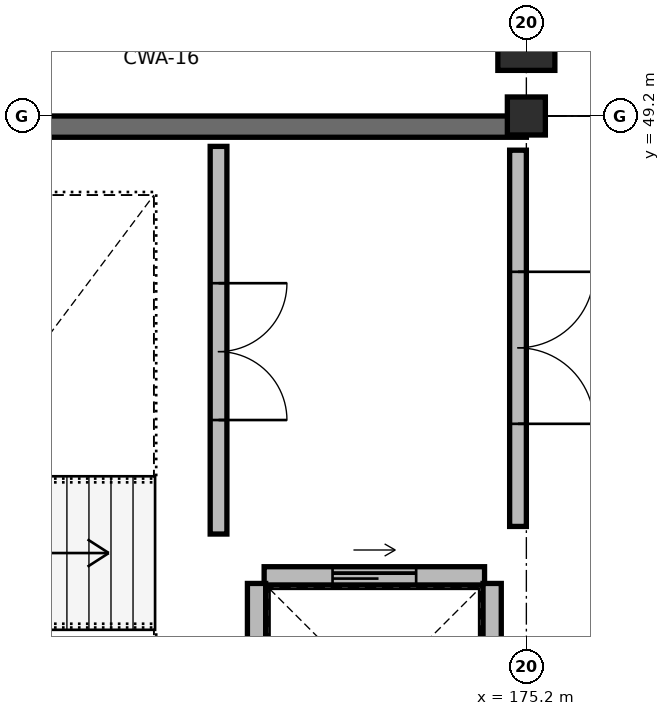
"""IFC4 building model, lengths in metres.
Left out: names, types, materials, properties, quantities, classifications, styles, units other than length and angle.
Written with IfcOpenShell. Run it as: python <this file> out.ifc"""

import sys

from ifc_helpers import new_model, si_unit, direction, frame, frame_2d, origin, origin_2d, place, context, subcontext, project, spatial, rectangle, extrude, element, fill, save


model = new_model("IFC4")
c1 = context("Model", 3, precision=1e-05, world=origin(), true_north=direction((0.0, 1.0)))
c2 = subcontext(c1, "Body", "Model", "MODEL_VIEW")
j1 = project(units=[si_unit("LENGTHUNIT", "METRE"), si_unit("PLANEANGLEUNIT", "RADIAN")], contexts=[c1])
p1 = place(None, origin())
s1 = spatial("IfcSite", under=j1, at=p1, CompositionType="ELEMENT")
p2 = place(p1, origin())
s2 = spatial("IfcBuilding", under=s1, at=p2, CompositionType="ELEMENT")
p3 = place(p2, frame((0.0, 0.0, 9.6)))
s3 = spatial("IfcBuildingStorey", under=s2, at=p3, CompositionType="ELEMENT", Elevation=9.6)
p4 = place(p3, frame((175.2, 50.4, 0.0), z_axis=(0.0, 0.0, 1.0), x_axis=(1.0, 0.0, 0.0)))
e1 = element("IfcColumn", 1, at=p4, inside=s3, PredefinedType="COLUMN", context=c2, shape_type="SweptSolid", body=[
    extrude(rectangle(XDim=0.75, YDim=1.2, at=origin_2d()), origin(), (0.0, 0.0, 1.0), 2.51),
])
p5 = place(p3, frame((175.2, 49.2, 0.0), z_axis=(0.0, 0.0, 1.0), x_axis=(1.0, 0.0, 0.0)))
e2 = element("IfcColumn", 2, at=p5, inside=s3, PredefinedType="COLUMN", context=c2, shape_type="SweptSolid", body=[
    extrude(rectangle(XDim=0.5, YDim=0.5, at=origin_2d()), origin(), (0.0, 0.0, 1.0), 4.5),
])
p6 = place(p3, frame((163.8, 49.06, 0.0), z_axis=(0.0, 0.0, 1.0), x_axis=(1.0, 0.0, 0.0)))
e3 = element("IfcWall", 3, at=p6, inside=s3, PredefinedType="SHEAR", context=c2, shape_type="SweptSolid", body=[
    extrude(rectangle(XDim=11.4, YDim=0.28, at=frame_2d((5.7, 0.0))), origin(), (0.0, 0.0, 1.0), 4.5),
])
p7 = place(p3, frame((171.15, 43.7, 0.0), z_axis=(0.0, 0.0, 1.0), x_axis=(0.0, 1.0, 0.0)))
e4 = element("IfcWall", 4, at=p7, inside=s3, PredefinedType="PARTITIONING", context=c2, shape_type="SweptSolid", body=[
    extrude(rectangle(XDim=5.1, YDim=0.22, at=frame_2d((2.55, 0.0))), origin(), (0.0, 0.0, 1.0), 4.205),
])
p8 = place(p7, frame((1.5, 0.0, 0.0)))
e5 = element("IfcOpeningElement", 5, at=p8, cuts=e4, PredefinedType="OPENING", context=c2, shape_type="SweptSolid", body=[
    extrude(rectangle(XDim=1.8, YDim=2.2, at=frame_2d((0.9, 1.1))), frame((0.0, 0.12, 0.0), z_axis=(0.0, -1.0, 0.0), x_axis=(1.0, 0.0, 0.0)), (0.0, 0.0, 1.0), 0.24),
])
p9 = place(p3, frame((171.75, 43.15, 0.0), z_axis=(0.0, 0.0, 1.0), x_axis=(1.0, 0.0, 0.0)))
e6 = element("IfcWall", 6, at=p9, inside=s3, PredefinedType="SOLIDWALL", context=c2, shape_type="SweptSolid", body=[
    extrude(rectangle(XDim=2.9, YDim=0.24, at=frame_2d((1.45, 0.0))), origin(), (0.0, 0.0, 1.0), 4.205),
])
p10 = place(p9, frame((0.9, 0.0, 0.0)))
e7 = element("IfcOpeningElement", 7, at=p10, cuts=e6, PredefinedType="OPENING", context=c2, shape_type="SweptSolid", body=[
    extrude(rectangle(XDim=1.1, YDim=2.15, at=frame_2d((0.55, 1.075))), frame((0.0, 0.13, 0.0), z_axis=(0.0, -1.0, 0.0), x_axis=(1.0, 0.0, 0.0)), (0.0, 0.0, 1.0), 0.26),
])
for number, where, z_axis, x_axis in (
    (8, (171.65, 40.05, 0.0), (0.0, 0.0, 1.0), (0.0, 1.0, 0.0)),
    (9, (174.75, 40.05, 0.0), (0.0, 0.0, 1.0), (0.0, 1.0, 0.0)),
):
    element("IfcWall", number, at=place(p3, frame(where, z_axis=z_axis, x_axis=x_axis)), inside=s3, PredefinedType="SOLIDWALL", context=c2, shape_type="SweptSolid", body=[
        extrude(rectangle(XDim=3.0, YDim=0.24, at=frame_2d((1.5, 0.0))), origin(), (0.0, 0.0, 1.0), 4.205),
    ])
p11 = place(p3, frame((175.09, 43.8, 0.0), z_axis=(0.0, 0.0, 1.0), x_axis=(0.0, 1.0, 0.0)))
e10 = element("IfcWall", 10, at=p11, inside=s3, PredefinedType="PARTITIONING", context=c2, shape_type="SweptSolid", body=[
    extrude(rectangle(XDim=4.95, YDim=0.22, at=frame_2d((2.475, 0.0))), origin(), (0.0, 0.0, 1.0), 3.635),
])
p12 = place(p11, frame((1.35, 0.0, 0.0)))
e11 = element("IfcOpeningElement", 11, at=p12, cuts=e10, PredefinedType="OPENING", context=c2, shape_type="SweptSolid", body=[
    extrude(rectangle(XDim=2.0, YDim=2.2, at=frame_2d((1.0, 1.1))), frame((0.0, 0.12, 0.0), z_axis=(0.0, -1.0, 0.0), x_axis=(1.0, 0.0, 0.0)), (0.0, 0.0, 1.0), 0.24),
])
p13 = place(p8, origin())
e12 = element("IfcDoor", 12, at=p13, inside=s3, OperationType="DOUBLE_DOOR_SINGLE_SWING", PredefinedType="DOOR", context=c2, shape_type="SweptSolid", body=[
    extrude(rectangle(XDim=1.8, YDim=2.2, at=frame_2d((0.9, 1.1))), frame((0.0, 0.025, 0.0), z_axis=(0.0, -1.0, 0.0), x_axis=(1.0, 0.0, 0.0)), (0.0, 0.0, 1.0), 0.05),
])
fill(e5, e12)
p14 = place(p10, origin())
e13 = element("IfcDoor", 13, at=p14, inside=s3, OperationType="DOUBLE_DOOR_SLIDING", PredefinedType="DOOR", context=c2, shape_type="SweptSolid", body=[
    extrude(rectangle(XDim=1.1, YDim=2.15, at=frame_2d((0.55, 1.075))), frame((0.0, 0.025, 0.0), z_axis=(0.0, -1.0, 0.0), x_axis=(1.0, 0.0, 0.0)), (0.0, 0.0, 1.0), 0.05),
])
fill(e7, e13)
p15 = place(p12, origin())
e14 = element("IfcDoor", 14, at=p15, inside=s3, OperationType="DOUBLE_DOOR_SINGLE_SWING", PredefinedType="DOOR", context=c2, shape_type="SweptSolid", body=[
    extrude(rectangle(XDim=2.0, YDim=2.2, at=frame_2d((1.0, 1.1))), frame((0.0, 0.025, 0.0), z_axis=(0.0, -1.0, 0.0), x_axis=(1.0, 0.0, 0.0)), (0.0, 0.0, 1.0), 0.05),
])
fill(e11, e14)
save(model, sys.argv[1])
